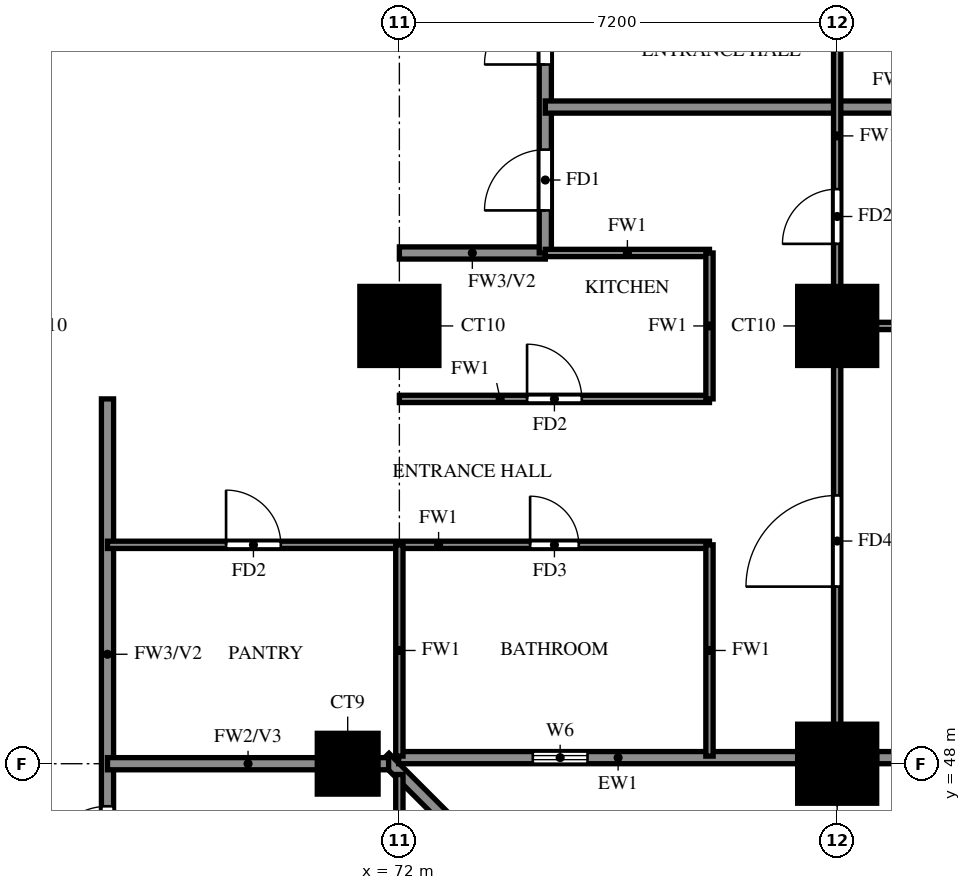
"""IFC4 building model, lengths in metres.
Left out: names, types, materials, properties, quantities, classifications, styles, units other than length and angle.
Written with IfcOpenShell. Run it as: python <this file> out.ifc"""

import sys

from ifc_helpers import new_model, si_unit, direction, frame, frame_2d, origin, origin_2d, place, context, subcontext, project, spatial, rectangle, extrude, source, transform, mapped, element, fill, save


model = new_model("IFC4")
c1 = context("Model", 3, precision=1e-05, world=origin(), true_north=direction((0.0, 1.0)))
c2 = subcontext(c1, "Body", "Model", "MODEL_VIEW")
j1 = project(units=[si_unit("LENGTHUNIT", "METRE"), si_unit("PLANEANGLEUNIT", "RADIAN")], contexts=[c1])
p1 = place(None, origin())
s1 = spatial("IfcSite", under=j1, at=p1, CompositionType="ELEMENT")
p2 = place(p1, origin())
s2 = spatial("IfcBuilding", under=s1, at=p2, CompositionType="ELEMENT")
p3 = place(p2, frame((0.0, 0.0, 83.0)))
s3 = spatial("IfcBuildingStorey", under=s2, at=p3, CompositionType="ELEMENT", Elevation=83.0)
m1 = source(origin(), c2, "Body", "SweptSolid", [
    extrude(rectangle(XDim=1.0, YDim=1.0, at=origin_2d()), origin(), (0.0, 0.0, 1.0), 3.18),
])
p4 = place(p3, frame((71.15, 48.0, 0.0), z_axis=(0.0, 0.0, 1.0), x_axis=(1.0, 0.0, 0.0)))
e1 = element("IfcColumn", 1, at=p4, inside=s3, PredefinedType="COLUMN", context=c2, shape_type="MappedRepresentation", body=[
    mapped(m1, transform((0.0, 0.0, 0.0))),
])
m2 = source(origin(), c2, "Body", "SweptSolid", [
    extrude(rectangle(XDim=1.3, YDim=1.3, at=origin_2d()), origin(), (0.0, 0.0, 1.0), 3.18),
])
for number, where, z_axis, x_axis in (
    (2, (79.2, 48.0, 0.0), (0.0, 0.0, 1.0), (1.0, 0.0, 0.0)),
    (3, (72.0, 55.2, 0.0), (0.0, 0.0, 1.0), (1.0, 0.0, 0.0)),
    (4, (79.2, 55.2, 0.0), (0.0, 0.0, 1.0), (1.0, 0.0, 0.0)),
):
    element("IfcColumn", number, at=place(p3, frame(where, z_axis=z_axis, x_axis=x_axis)), inside=s3, PredefinedType="COLUMN", context=c2, shape_type="MappedRepresentation", body=[
        mapped(m2, transform((0.0, 0.0, 0.0))),
    ])
p5 = place(p3, frame((85.996, 33.863, 0.0), z_axis=(0.0, 0.0, 1.0), x_axis=(-0.707100718496, 0.707112843825, 0.0)))
e5 = element("IfcWall", 5, at=p5, inside=s3, PredefinedType="SOLIDWALL", context=c2, shape_type="SweptSolid", body=[
    extrude(rectangle(XDim=20.135, YDim=0.2, at=frame_2d((10.067, 0.0))), origin(), (0.0, 0.0, 1.0), 3.18),
])
p6 = place(p3, frame((71.989, 48.1, 0.0), z_axis=(0.0, 0.0, 1.0), x_axis=(1.0, 0.0, 0.0)))
e6 = element("IfcWall", 6, at=p6, inside=s3, PredefinedType="SOLIDWALL", context=c2, shape_type="SweptSolid", body=[
    extrude(rectangle(XDim=6.562, YDim=0.2, at=frame_2d((3.281, 0.0))), origin(), (0.0, 0.0, 1.0), 3.18),
])
p7 = place(p6, frame((2.206, 0.0, 1.5)))
e7 = element("IfcOpeningElement", 7, at=p7, cuts=e6, PredefinedType="OPENING", context=c2, shape_type="SweptSolid", body=[
    extrude(rectangle(XDim=0.9, YDim=0.9, at=frame_2d((0.45, 0.45))), frame((0.0, 0.11, 0.0), z_axis=(0.0, -1.0, 0.0), x_axis=(1.0, 0.0, 0.0)), (0.0, 0.0, 1.0), 0.22),
])
p8 = place(p3, frame((79.85, 48.1, 0.0), z_axis=(0.0, 0.0, 1.0), x_axis=(1.0, 0.0, 0.0)))
e8 = element("IfcWall", 8, at=p8, inside=s3, PredefinedType="SOLIDWALL", context=c2, shape_type="SweptSolid", body=[
    extrude(rectangle(XDim=5.45, YDim=0.2, at=frame_2d((2.725, 0.0))), origin(), (0.0, 0.0, 1.0), 3.18),
])
p9 = place(p8, frame((1.525, 0.0, 0.6)))
e9 = element("IfcOpeningElement", 9, at=p9, cuts=e8, PredefinedType="OPENING", context=c2, shape_type="SweptSolid", body=[
    extrude(rectangle(XDim=2.4, YDim=2.4, at=frame_2d((1.2, 1.2))), frame((0.0, 0.11, 0.0), z_axis=(0.0, -1.0, 0.0), x_axis=(1.0, 0.0, 0.0)), (0.0, 0.0, 1.0), 0.22),
])
p10 = place(p3, frame((72.0, 56.4, 0.0), z_axis=(0.0, 0.0, 1.0), x_axis=(1.0, 0.0, 0.0)))
e10 = element("IfcWall", 10, at=p10, inside=s3, PredefinedType="SOLIDWALL", context=c2, shape_type="SweptSolid", body=[
    extrude(rectangle(XDim=2.4, YDim=0.2, at=frame_2d((1.2, 0.0))), origin(), (0.0, 0.0, 1.0), 3.18),
])
p11 = place(p3, frame((67.2, 45.6, 0.0), z_axis=(0.0, 0.0, 1.0), x_axis=(0.0, 1.0, 0.0)))
e11 = element("IfcWall", 11, at=p11, inside=s3, PredefinedType="SOLIDWALL", context=c2, shape_type="SweptSolid", body=[
    extrude(rectangle(XDim=8.4, YDim=0.2, at=frame_2d((4.2, 0.0))), origin(), (0.0, 0.0, 1.0), 3.18),
])
p12 = place(p11, frame((0.7, 0.0, 0.0)))
e12 = element("IfcOpeningElement", 12, at=p12, cuts=e11, PredefinedType="OPENING", context=c2, shape_type="SweptSolid", body=[
    extrude(rectangle(XDim=1.0, YDim=2.1, at=frame_2d((0.5, 1.05))), frame((0.0, 0.11, 0.0), z_axis=(0.0, -1.0, 0.0), x_axis=(1.0, 0.0, 0.0)), (0.0, 0.0, 1.0), 0.22),
])
p13 = place(p3, frame((74.4, 56.4, 0.0), z_axis=(0.0, 0.0, 1.0), x_axis=(0.0, 1.0, 0.0)))
e13 = element("IfcWall", 13, at=p13, inside=s3, PredefinedType="SOLIDWALL", context=c2, shape_type="SweptSolid", body=[
    extrude(rectangle(XDim=9.6, YDim=0.2, at=frame_2d((4.8, 0.0))), origin(), (0.0, 0.0, 1.0), 3.18),
])
p14 = place(p13, frame((0.7, 0.0, 0.0)))
e14 = element("IfcOpeningElement", 14, at=p14, cuts=e13, PredefinedType="OPENING", context=c2, shape_type="SweptSolid", body=[
    extrude(rectangle(XDim=1.0, YDim=2.1, at=frame_2d((0.5, 1.05))), frame((0.0, 0.11, 0.0), z_axis=(0.0, -1.0, 0.0), x_axis=(1.0, 0.0, 0.0)), (0.0, 0.0, 1.0), 0.22),
])
p15 = place(p13, frame((3.1, 0.0, 0.0)))
e15 = element("IfcOpeningElement", 15, at=p15, cuts=e13, PredefinedType="OPENING", context=c2, shape_type="SweptSolid", body=[
    extrude(rectangle(XDim=1.0, YDim=2.1, at=frame_2d((0.5, 1.05))), frame((0.0, 0.11, 0.0), z_axis=(0.0, -1.0, 0.0), x_axis=(1.0, 0.0, 0.0)), (0.0, 0.0, 1.0), 0.22),
])
p16 = place(p3, frame((67.2, 48.0, 0.0), z_axis=(0.0, 0.0, 1.0), x_axis=(1.0, 0.0, 0.0)))
e16 = element("IfcWall", 16, at=p16, inside=s3, PredefinedType="SOLIDWALL", context=c2, shape_type="SweptSolid", body=[
    extrude(rectangle(XDim=4.623, YDim=0.2, at=frame_2d((2.312, 0.0))), origin(), (0.0, 0.0, 1.0), 3.18),
])
p17 = place(p3, frame((74.4, 58.8, 0.0), z_axis=(0.0, 0.0, 1.0), x_axis=(1.0, 0.0, 0.0)))
e17 = element("IfcWall", 17, at=p17, inside=s3, PredefinedType="SOLIDWALL", context=c2, shape_type="SweptSolid", body=[
    extrude(rectangle(XDim=11.875, YDim=0.2, at=frame_2d((5.938, 0.0))), origin(), (0.0, 0.0, 1.0), 2.28),
])
p18 = place(p3, frame((67.2, 51.6, 0.0), z_axis=(0.0, 0.0, 1.0), x_axis=(1.0, 0.0, 0.0)))
e18 = element("IfcWall", 18, at=p18, inside=s3, PredefinedType="PARTITIONING", context=c2, shape_type="SweptSolid", body=[
    extrude(rectangle(XDim=9.9, YDim=0.12, at=frame_2d((4.95, 0.0))), origin(), (0.0, 0.0, 1.0), 3.18),
])
p19 = place(p18, frame((6.95, 0.0, 0.0)))
e19 = element("IfcOpeningElement", 19, at=p19, cuts=e18, PredefinedType="OPENING", context=c2, shape_type="SweptSolid", body=[
    extrude(rectangle(XDim=0.8, YDim=2.1, at=frame_2d((0.4, 1.05))), frame((0.0, 0.07, 0.0), z_axis=(0.0, -1.0, 0.0), x_axis=(1.0, 0.0, 0.0)), (0.0, 0.0, 1.0), 0.14),
])
p20 = place(p18, frame((1.95, 0.0, 0.0)))
e20 = element("IfcOpeningElement", 20, at=p20, cuts=e18, PredefinedType="OPENING", context=c2, shape_type="SweptSolid", body=[
    extrude(rectangle(XDim=0.9, YDim=2.1, at=frame_2d((0.45, 1.05))), frame((0.0, 0.07, 0.0), z_axis=(0.0, -1.0, 0.0), x_axis=(1.0, 0.0, 0.0)), (0.0, 0.0, 1.0), 0.14),
])
p21 = place(p3, frame((72.0, 54.0, 0.0), z_axis=(0.0, 0.0, 1.0), x_axis=(1.0, 0.0, 0.0)))
e21 = element("IfcWall", 21, at=p21, inside=s3, PredefinedType="PARTITIONING", context=c2, shape_type="SweptSolid", body=[
    extrude(rectangle(XDim=5.1, YDim=0.12, at=frame_2d((2.55, 0.0))), origin(), (0.0, 0.0, 1.0), 3.18),
])
p22 = place(p21, frame((2.1, 0.0, 0.0)))
e22 = element("IfcOpeningElement", 22, at=p22, cuts=e21, PredefinedType="OPENING", context=c2, shape_type="SweptSolid", body=[
    extrude(rectangle(XDim=0.9, YDim=2.1, at=frame_2d((0.45, 1.05))), frame((0.0, 0.07, 0.0), z_axis=(0.0, -1.0, 0.0), x_axis=(1.0, 0.0, 0.0)), (0.0, 0.0, 1.0), 0.14),
])
p23 = place(p3, frame((79.2, 55.2, 0.0), z_axis=(0.0, 0.0, 1.0), x_axis=(1.0, 0.0, 0.0)))
e23 = element("IfcWall", 23, at=p23, inside=s3, PredefinedType="PARTITIONING", context=c2, shape_type="SweptSolid", body=[
    extrude(rectangle(XDim=7.075, YDim=0.12, at=frame_2d((3.538, 0.0))), origin(), (0.0, 0.0, 1.0), 3.18),
])
p24 = place(p3, frame((74.4, 56.4, 0.0), z_axis=(0.0, 0.0, 1.0), x_axis=(1.0, 0.0, 0.0)))
e24 = element("IfcWall", 24, at=p24, inside=s3, PredefinedType="PARTITIONING", context=c2, shape_type="SweptSolid", body=[
    extrude(rectangle(XDim=2.7, YDim=0.12, at=frame_2d((1.35, 0.0))), origin(), (0.0, 0.0, 1.0), 3.18),
])
p25 = place(p3, frame((72.0, 33.725, 0.0), z_axis=(0.0, 0.0, 1.0), x_axis=(0.0, 1.0, 0.0)))
e25 = element("IfcWall", 25, at=p25, inside=s3, PredefinedType="PARTITIONING", context=c2, shape_type="SweptSolid", body=[
    extrude(rectangle(XDim=14.098, YDim=0.12, at=frame_2d((7.049, 0.0))), origin(), (0.0, 0.0, 1.0), 2.28),
])
p26 = place(p25, frame((10.075, 0.0, 0.0)))
e26 = element("IfcOpeningElement", 26, at=p26, cuts=e25, PredefinedType="OPENING", context=c2, shape_type="SweptSolid", body=[
    extrude(rectangle(XDim=0.9, YDim=2.1, at=frame_2d((0.45, 1.05))), frame((0.0, 0.07, 0.0), z_axis=(0.0, -1.0, 0.0), x_axis=(1.0, 0.0, 0.0)), (0.0, 0.0, 1.0), 0.14),
])
for number, where, z_axis, x_axis in (
    (27, (72.0, 48.125, 0.0), (0.0, 0.0, 1.0), (0.0, 1.0, 0.0)),
    (28, (77.1, 48.125, 0.0), (0.0, 0.0, 1.0), (0.0, 1.0, 0.0)),
):
    element("IfcWall", number, at=place(p3, frame(where, z_axis=z_axis, x_axis=x_axis)), inside=s3, PredefinedType="PARTITIONING", context=c2, shape_type="SweptSolid", body=[
        extrude(rectangle(XDim=3.475, YDim=0.12, at=frame_2d((1.738, 0.0))), origin(), (0.0, 0.0, 1.0), 3.18),
    ])
p27 = place(p3, frame((77.1, 54.0, 0.0), z_axis=(0.0, 0.0, 1.0), x_axis=(0.0, 1.0, 0.0)))
e29 = element("IfcWall", 29, at=p27, inside=s3, PredefinedType="PARTITIONING", context=c2, shape_type="SweptSolid", body=[
    extrude(rectangle(XDim=2.4, YDim=0.12, at=frame_2d((1.2, 0.0))), origin(), (0.0, 0.0, 1.0), 3.18),
])
p28 = place(p3, frame((79.2, 48.125, 0.0), z_axis=(0.0, 0.0, 1.0), x_axis=(0.0, 1.0, 0.0)))
e30 = element("IfcWall", 30, at=p28, inside=s3, PredefinedType="PARTITIONING", context=c2, shape_type="SweptSolid", body=[
    extrude(rectangle(XDim=21.475, YDim=0.12, at=frame_2d((10.738, 0.0))), origin(), (0.0, 0.0, 1.0), 3.18),
])
p29 = place(p28, frame((2.788, 0.0, 0.0)))
e31 = element("IfcOpeningElement", 31, at=p29, cuts=e30, PredefinedType="OPENING", context=c2, shape_type="SweptSolid", body=[
    extrude(rectangle(XDim=1.5, YDim=2.1, at=frame_2d((0.75, 1.05))), frame((0.0, 0.07, 0.0), z_axis=(0.0, -1.0, 0.0), x_axis=(1.0, 0.0, 0.0)), (0.0, 0.0, 1.0), 0.14),
])
p30 = place(p28, frame((8.425, 0.0, 0.0)))
e32 = element("IfcOpeningElement", 32, at=p30, cuts=e30, PredefinedType="OPENING", context=c2, shape_type="SweptSolid", body=[
    extrude(rectangle(XDim=0.9, YDim=2.1, at=frame_2d((0.45, 1.05))), frame((0.0, 0.07, 0.0), z_axis=(0.0, -1.0, 0.0), x_axis=(1.0, 0.0, 0.0)), (0.0, 0.0, 1.0), 0.14),
])
p31 = place(p28, frame((12.025, 0.0, 0.0)))
e33 = element("IfcOpeningElement", 33, at=p31, cuts=e30, PredefinedType="OPENING", context=c2, shape_type="SweptSolid", body=[
    extrude(rectangle(XDim=0.9, YDim=2.1, at=frame_2d((0.45, 1.05))), frame((0.0, 0.07, 0.0), z_axis=(0.0, -1.0, 0.0), x_axis=(1.0, 0.0, 0.0)), (0.0, 0.0, 1.0), 0.14),
])
p32 = place(p28, frame((17.425, 0.0, 0.0)))
e34 = element("IfcOpeningElement", 34, at=p32, cuts=e30, PredefinedType="OPENING", context=c2, shape_type="SweptSolid", body=[
    extrude(rectangle(XDim=0.9, YDim=2.1, at=frame_2d((0.45, 1.05))), frame((0.0, 0.07, 0.0), z_axis=(0.0, -1.0, 0.0), x_axis=(1.0, 0.0, 0.0)), (0.0, 0.0, 1.0), 0.14),
])
p33 = place(p7, origin())
e35 = element("IfcWindow", 35, at=p33, inside=s3, PartitioningType="SINGLE_PANEL", PredefinedType="WINDOW", context=c2, shape_type="SweptSolid", body=[
    extrude(rectangle(XDim=0.9, YDim=0.9, at=frame_2d((0.45, 0.45))), frame((0.0, 0.03, 0.0), z_axis=(0.0, -1.0, 0.0), x_axis=(1.0, 0.0, 0.0)), (0.0, 0.0, 1.0), 0.06),
])
fill(e7, e35)
p34 = place(p14, origin())
e36 = element("IfcDoor", 36, at=p34, inside=s3, OperationType="SINGLE_SWING_LEFT", PredefinedType="DOOR", context=c2, shape_type="SweptSolid", body=[
    extrude(rectangle(XDim=1.0, YDim=2.1, at=frame_2d((0.5, 1.05))), frame((0.0, 0.025, 0.0), z_axis=(0.0, -1.0, 0.0), x_axis=(1.0, 0.0, 0.0)), (0.0, 0.0, 1.0), 0.05),
])
fill(e14, e36)
p35 = place(p29, origin())
e37 = element("IfcDoor", 37, at=p35, inside=s3, OperationType="SINGLE_SWING_RIGHT", PredefinedType="DOOR", context=c2, shape_type="SweptSolid", body=[
    extrude(rectangle(XDim=1.5, YDim=2.1, at=frame_2d((0.75, 1.05))), frame((0.0, 0.025, 0.0), z_axis=(0.0, -1.0, 0.0), x_axis=(1.0, 0.0, 0.0)), (0.0, 0.0, 1.0), 0.05),
])
fill(e31, e37)
p36 = place(p30, origin())
e38 = element("IfcDoor", 38, at=p36, inside=s3, OperationType="SINGLE_SWING_LEFT", PredefinedType="DOOR", context=c2, shape_type="SweptSolid", body=[
    extrude(rectangle(XDim=0.9, YDim=2.1, at=frame_2d((0.45, 1.05))), frame((0.0, 0.025, 0.0), z_axis=(0.0, -1.0, 0.0), x_axis=(1.0, 0.0, 0.0)), (0.0, 0.0, 1.0), 0.05),
])
fill(e32, e38)
p37 = place(p19, origin())
e39 = element("IfcDoor", 39, at=p37, inside=s3, OperationType="SINGLE_SWING_LEFT", PredefinedType="DOOR", context=c2, shape_type="SweptSolid", body=[
    extrude(rectangle(XDim=0.8, YDim=2.1, at=frame_2d((0.4, 1.05))), frame((0.0, 0.025, 0.0), z_axis=(0.0, -1.0, 0.0), x_axis=(1.0, 0.0, 0.0)), (0.0, 0.0, 1.0), 0.05),
])
fill(e19, e39)
p38 = place(p22, origin())
e40 = element("IfcDoor", 40, at=p38, inside=s3, OperationType="SINGLE_SWING_RIGHT", PredefinedType="DOOR", context=c2, shape_type="SweptSolid", body=[
    extrude(rectangle(XDim=0.9, YDim=2.1, at=frame_2d((0.45, 1.05))), frame((0.0, 0.025, 0.0), z_axis=(0.0, -1.0, 0.0), x_axis=(1.0, 0.0, 0.0)), (0.0, 0.0, 1.0), 0.05),
])
fill(e22, e40)
p39 = place(p20, origin())
e41 = element("IfcDoor", 41, at=p39, inside=s3, OperationType="SINGLE_SWING_LEFT", PredefinedType="DOOR", context=c2, shape_type="SweptSolid", body=[
    extrude(rectangle(XDim=0.9, YDim=2.1, at=frame_2d((0.45, 1.05))), frame((0.0, 0.025, 0.0), z_axis=(0.0, -1.0, 0.0), x_axis=(1.0, 0.0, 0.0)), (0.0, 0.0, 1.0), 0.05),
])
fill(e20, e41)
p40 = place(p15, origin())
e42 = element("IfcDoor", 42, at=p40, inside=s3, OperationType="SINGLE_SWING_RIGHT", PredefinedType="DOOR", context=c2, shape_type="SweptSolid", body=[
    extrude(rectangle(XDim=1.0, YDim=2.1, at=frame_2d((0.5, 1.05))), frame((0.0, 0.025, 0.0), z_axis=(0.0, -1.0, 0.0), x_axis=(1.0, 0.0, 0.0)), (0.0, 0.0, 1.0), 0.05),
])
fill(e15, e42)
p41 = place(p12, origin())
e43 = element("IfcDoor", 43, at=p41, inside=s3, OperationType="SINGLE_SWING_RIGHT", PredefinedType="DOOR", context=c2, shape_type="SweptSolid", body=[
    extrude(rectangle(XDim=1.0, YDim=2.1, at=frame_2d((0.5, 1.05))), frame((0.0, 0.025, 0.0), z_axis=(0.0, -1.0, 0.0), x_axis=(1.0, 0.0, 0.0)), (0.0, 0.0, 1.0), 0.05),
])
fill(e12, e43)
save(model, sys.argv[1])
